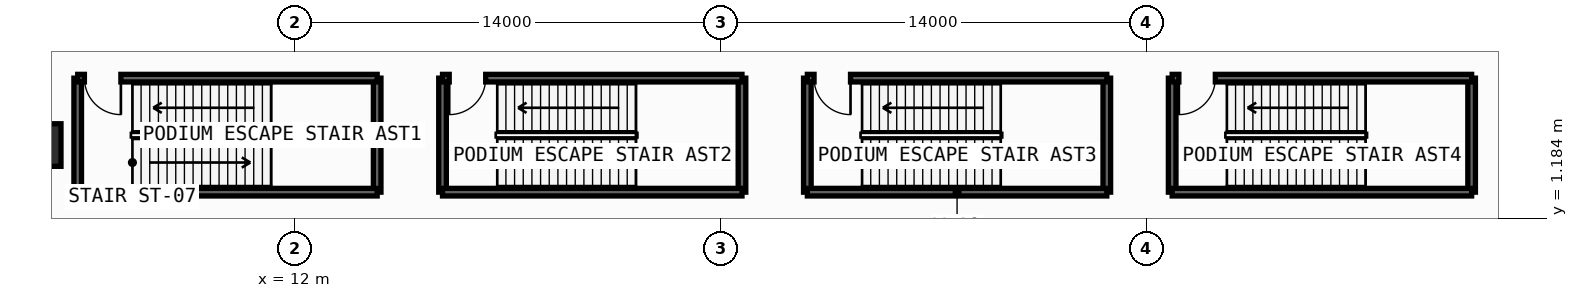
"""IFC4 building model, lengths in metres.
Left out: names, types, materials, properties, quantities, classifications, styles, units other than length and angle.
Written with IfcOpenShell. Run it as: python <this file> out.ifc"""

import sys

from ifc_helpers import new_model, si_unit, direction, frame, frame_2d, origin, origin_2d, place, context, subcontext, project, spatial, rectangle, extrude, element, fill, save


model = new_model("IFC4")
c1 = context("Model", 3, precision=1e-05, world=origin(), true_north=direction((0.0, 1.0)))
c2 = subcontext(c1, "Body", "Model", "MODEL_VIEW")
j1 = project(units=[si_unit("LENGTHUNIT", "METRE"), si_unit("PLANEANGLEUNIT", "RADIAN")], contexts=[c1])
p1 = place(None, origin())
s1 = spatial("IfcSite", under=j1, at=p1, CompositionType="ELEMENT")
p2 = place(p1, origin())
s2 = spatial("IfcBuilding", under=s1, at=p2, CompositionType="ELEMENT")
p3 = place(p2, frame((0.0, 0.0, -6.0)))
s3 = spatial("IfcBuildingStorey", under=s2, at=p3, CompositionType="ELEMENT", Elevation=-6.0)
p4 = place(p3, frame((3.6, 3.6, -0.6), z_axis=(0.0, 0.0, 1.0), x_axis=(1.0, 0.0, 0.0)))
e1 = element("IfcColumn", 1, at=p4, inside=s3, PredefinedType="COLUMN", context=c2, shape_type="SweptSolid", body=[
    extrude(rectangle(XDim=1.4, YDim=1.4, at=origin_2d()), origin(), (0.0, 0.0, 1.0), 6.6),
])
for number, where, z_axis, x_axis in (
    (2, (4.85, 2.05, -0.6), (0.0, 0.0, 1.0), (0.0, 1.0, 0.0)),
    (3, (14.7, 2.05, -0.6), (0.0, 0.0, 1.0), (0.0, 1.0, 0.0)),
):
    element("IfcWall", number, at=place(p3, frame(where, z_axis=z_axis, x_axis=x_axis)), inside=s3, PredefinedType="SOLIDWALL", context=c2, shape_type="SweptSolid", body=[
        extrude(rectangle(XDim=3.75, YDim=0.25, at=frame_2d((1.875, 0.0))), origin(), (0.0, 0.0, 1.0), 6.2),
    ])
p5 = place(p3, frame((4.85, 2.05, -0.6), z_axis=(0.0, 0.0, 1.0), x_axis=(1.0, 0.0, 0.0)))
e4 = element("IfcWall", 4, at=p5, inside=s3, PredefinedType="SOLIDWALL", context=c2, shape_type="SweptSolid", body=[
    extrude(rectangle(XDim=9.85, YDim=0.25, at=frame_2d((4.925, 0.0))), origin(), (0.0, 0.0, 1.0), 6.2),
])
p6 = place(p3, frame((4.85, 5.8, -0.6), z_axis=(0.0, 0.0, 1.0), x_axis=(1.0, 0.0, 0.0)))
e5 = element("IfcWall", 5, at=p6, inside=s3, PredefinedType="SOLIDWALL", context=c2, shape_type="SweptSolid", body=[
    extrude(rectangle(XDim=9.85, YDim=0.25, at=frame_2d((4.925, 0.0))), origin(), (0.0, 0.0, 1.0), 6.2),
])
p7 = place(p6, frame((0.22, 0.0, 0.6)))
e6 = element("IfcOpeningElement", 6, at=p7, cuts=e5, PredefinedType="OPENING", context=c2, shape_type="SweptSolid", body=[
    extrude(rectangle(XDim=1.2, YDim=2.2, at=frame_2d((0.6, 1.1))), frame((0.0, 0.135, 0.0), z_axis=(0.0, -1.0, 0.0), x_axis=(1.0, 0.0, 0.0)), (0.0, 0.0, 1.0), 0.27),
])
for number, where, z_axis, x_axis in (
    (7, (16.85, 2.05, -0.6), (0.0, 0.0, 1.0), (0.0, 1.0, 0.0)),
    (8, (26.7, 2.05, -0.6), (0.0, 0.0, 1.0), (0.0, 1.0, 0.0)),
):
    element("IfcWall", number, at=place(p3, frame(where, z_axis=z_axis, x_axis=x_axis)), inside=s3, PredefinedType="SOLIDWALL", context=c2, shape_type="SweptSolid", body=[
        extrude(rectangle(XDim=3.75, YDim=0.25, at=frame_2d((1.875, 0.0))), origin(), (0.0, 0.0, 1.0), 6.2),
    ])
p8 = place(p3, frame((16.85, 2.05, -0.6), z_axis=(0.0, 0.0, 1.0), x_axis=(1.0, 0.0, 0.0)))
e9 = element("IfcWall", 9, at=p8, inside=s3, PredefinedType="SOLIDWALL", context=c2, shape_type="SweptSolid", body=[
    extrude(rectangle(XDim=9.85, YDim=0.25, at=frame_2d((4.925, 0.0))), origin(), (0.0, 0.0, 1.0), 6.2),
])
p9 = place(p3, frame((16.85, 5.8, -0.6), z_axis=(0.0, 0.0, 1.0), x_axis=(1.0, 0.0, 0.0)))
e10 = element("IfcWall", 10, at=p9, inside=s3, PredefinedType="SOLIDWALL", context=c2, shape_type="SweptSolid", body=[
    extrude(rectangle(XDim=9.85, YDim=0.25, at=frame_2d((4.925, 0.0))), origin(), (0.0, 0.0, 1.0), 6.2),
])
p10 = place(p9, frame((0.22, 0.0, 0.6)))
e11 = element("IfcOpeningElement", 11, at=p10, cuts=e10, PredefinedType="OPENING", context=c2, shape_type="SweptSolid", body=[
    extrude(rectangle(XDim=1.2, YDim=2.2, at=frame_2d((0.6, 1.1))), frame((0.0, 0.135, 0.0), z_axis=(0.0, -1.0, 0.0), x_axis=(1.0, 0.0, 0.0)), (0.0, 0.0, 1.0), 0.27),
])
for number, where, z_axis, x_axis in (
    (12, (28.85, 2.05, -0.6), (0.0, 0.0, 1.0), (0.0, 1.0, 0.0)),
    (13, (38.7, 2.05, -0.6), (0.0, 0.0, 1.0), (0.0, 1.0, 0.0)),
):
    element("IfcWall", number, at=place(p3, frame(where, z_axis=z_axis, x_axis=x_axis)), inside=s3, PredefinedType="SOLIDWALL", context=c2, shape_type="SweptSolid", body=[
        extrude(rectangle(XDim=3.75, YDim=0.25, at=frame_2d((1.875, 0.0))), origin(), (0.0, 0.0, 1.0), 6.2),
    ])
p11 = place(p3, frame((28.85, 2.05, -0.6), z_axis=(0.0, 0.0, 1.0), x_axis=(1.0, 0.0, 0.0)))
e14 = element("IfcWall", 14, at=p11, inside=s3, PredefinedType="SOLIDWALL", context=c2, shape_type="SweptSolid", body=[
    extrude(rectangle(XDim=9.85, YDim=0.25, at=frame_2d((4.925, 0.0))), origin(), (0.0, 0.0, 1.0), 6.2),
])
p12 = place(p3, frame((28.85, 5.8, -0.6), z_axis=(0.0, 0.0, 1.0), x_axis=(1.0, 0.0, 0.0)))
e15 = element("IfcWall", 15, at=p12, inside=s3, PredefinedType="SOLIDWALL", context=c2, shape_type="SweptSolid", body=[
    extrude(rectangle(XDim=9.85, YDim=0.25, at=frame_2d((4.925, 0.0))), origin(), (0.0, 0.0, 1.0), 6.2),
])
p13 = place(p12, frame((0.22, 0.0, 0.6)))
e16 = element("IfcOpeningElement", 16, at=p13, cuts=e15, PredefinedType="OPENING", context=c2, shape_type="SweptSolid", body=[
    extrude(rectangle(XDim=1.2, YDim=2.2, at=frame_2d((0.6, 1.1))), frame((0.0, 0.135, 0.0), z_axis=(0.0, -1.0, 0.0), x_axis=(1.0, 0.0, 0.0)), (0.0, 0.0, 1.0), 0.27),
])
for number, where, z_axis, x_axis in (
    (17, (40.85, 2.05, -0.6), (0.0, 0.0, 1.0), (0.0, 1.0, 0.0)),
    (18, (50.7, 2.05, -0.6), (0.0, 0.0, 1.0), (0.0, 1.0, 0.0)),
):
    element("IfcWall", number, at=place(p3, frame(where, z_axis=z_axis, x_axis=x_axis)), inside=s3, PredefinedType="SOLIDWALL", context=c2, shape_type="SweptSolid", body=[
        extrude(rectangle(XDim=3.75, YDim=0.25, at=frame_2d((1.875, 0.0))), origin(), (0.0, 0.0, 1.0), 6.2),
    ])
p14 = place(p3, frame((40.85, 2.05, -0.6), z_axis=(0.0, 0.0, 1.0), x_axis=(1.0, 0.0, 0.0)))
e19 = element("IfcWall", 19, at=p14, inside=s3, PredefinedType="SOLIDWALL", context=c2, shape_type="SweptSolid", body=[
    extrude(rectangle(XDim=9.85, YDim=0.25, at=frame_2d((4.925, 0.0))), origin(), (0.0, 0.0, 1.0), 6.2),
])
p15 = place(p3, frame((40.85, 5.8, -0.6), z_axis=(0.0, 0.0, 1.0), x_axis=(1.0, 0.0, 0.0)))
e20 = element("IfcWall", 20, at=p15, inside=s3, PredefinedType="SOLIDWALL", context=c2, shape_type="SweptSolid", body=[
    extrude(rectangle(XDim=9.85, YDim=0.25, at=frame_2d((4.925, 0.0))), origin(), (0.0, 0.0, 1.0), 6.2),
])
p16 = place(p15, frame((0.22, 0.0, 0.6)))
e21 = element("IfcOpeningElement", 21, at=p16, cuts=e20, PredefinedType="OPENING", context=c2, shape_type="SweptSolid", body=[
    extrude(rectangle(XDim=1.2, YDim=2.2, at=frame_2d((0.6, 1.1))), frame((0.0, 0.135, 0.0), z_axis=(0.0, -1.0, 0.0), x_axis=(1.0, 0.0, 0.0)), (0.0, 0.0, 1.0), 0.27),
])
p17 = place(p7, frame((1.2, 0.0, 0.0), z_axis=(0.0, 0.0, 1.0), x_axis=(-1.0, 0.0, 0.0)))
e22 = element("IfcDoor", 22, at=p17, inside=s3, OperationType="SINGLE_SWING_LEFT", PredefinedType="USERDEFINED", context=c2, shape_type="SweptSolid", body=[
    extrude(rectangle(XDim=1.2, YDim=2.2, at=frame_2d((0.6, 1.1))), frame((0.0, 0.025, 0.0), z_axis=(0.0, -1.0, 0.0), x_axis=(1.0, 0.0, 0.0)), (0.0, 0.0, 1.0), 0.05),
])
fill(e6, e22)
p18 = place(p10, frame((1.2, 0.0, 0.0), z_axis=(0.0, 0.0, 1.0), x_axis=(-1.0, 0.0, 0.0)))
e23 = element("IfcDoor", 23, at=p18, inside=s3, OperationType="SINGLE_SWING_RIGHT", PredefinedType="USERDEFINED", context=c2, shape_type="SweptSolid", body=[
    extrude(rectangle(XDim=1.2, YDim=2.2, at=frame_2d((0.6, 1.1))), frame((0.0, 0.025, 0.0), z_axis=(0.0, -1.0, 0.0), x_axis=(1.0, 0.0, 0.0)), (0.0, 0.0, 1.0), 0.05),
])
fill(e11, e23)
p19 = place(p13, frame((1.2, 0.0, 0.0), z_axis=(0.0, 0.0, 1.0), x_axis=(-1.0, 0.0, 0.0)))
e24 = element("IfcDoor", 24, at=p19, inside=s3, OperationType="SINGLE_SWING_LEFT", PredefinedType="USERDEFINED", context=c2, shape_type="SweptSolid", body=[
    extrude(rectangle(XDim=1.2, YDim=2.2, at=frame_2d((0.6, 1.1))), frame((0.0, 0.025, 0.0), z_axis=(0.0, -1.0, 0.0), x_axis=(1.0, 0.0, 0.0)), (0.0, 0.0, 1.0), 0.05),
])
fill(e16, e24)
p20 = place(p16, frame((1.2, 0.0, 0.0), z_axis=(0.0, 0.0, 1.0), x_axis=(-1.0, 0.0, 0.0)))
e25 = element("IfcDoor", 25, at=p20, inside=s3, OperationType="SINGLE_SWING_RIGHT", PredefinedType="USERDEFINED", context=c2, shape_type="SweptSolid", body=[
    extrude(rectangle(XDim=1.2, YDim=2.2, at=frame_2d((0.6, 1.1))), frame((0.0, 0.025, 0.0), z_axis=(0.0, -1.0, 0.0), x_axis=(1.0, 0.0, 0.0)), (0.0, 0.0, 1.0), 0.05),
])
fill(e21, e25)
save(model, sys.argv[1])
